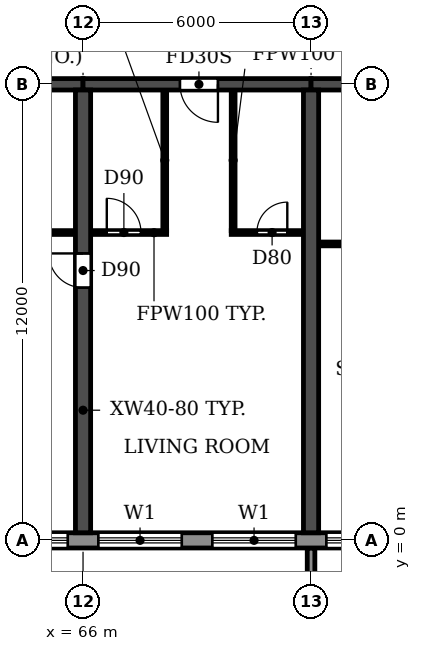
"""IFC4 building model, lengths in metres.
Left out: names, types, materials, properties, quantities, classifications, styles, units other than length and angle.
Written with IfcOpenShell. Run it as: python <this file> out.ifc"""

import sys

from ifc_helpers import new_model, si_unit, direction, frame, frame_2d, origin, place, context, subcontext, project, spatial, polyline, rectangle, outline, extrude, source, transform, mapped, element, fill, save


model = new_model("IFC4")
c1 = context("Model", 3, precision=1e-05, world=origin(), true_north=direction((0.0, 1.0)))
c2 = subcontext(c1, "Body", "Model", "MODEL_VIEW")
j1 = project(units=[si_unit("LENGTHUNIT", "METRE"), si_unit("PLANEANGLEUNIT", "RADIAN")], contexts=[c1])
p1 = place(None, origin())
s1 = spatial("IfcSite", under=j1, at=p1, CompositionType="ELEMENT")
p2 = place(p1, origin())
s2 = spatial("IfcBuilding", under=s1, at=p2, CompositionType="ELEMENT")
p3 = place(p2, frame((0.0, 0.0, 56.4)))
s3 = spatial("IfcBuildingStorey", under=s2, at=p3, CompositionType="ELEMENT", Elevation=56.4)
p4 = place(p3, frame((66.0, 0.2, 0.0), z_axis=(0.0, 0.0, 1.0), x_axis=(0.0, 1.0, 0.0)))
e1 = element("IfcWall", 1, at=p4, inside=s3, PredefinedType="SHEAR", context=c2, shape_type="SweptSolid", body=[
    extrude(rectangle(XDim=11.65, YDim=0.4, at=frame_2d((5.825, 0.0))), origin(), (0.0, 0.0, 1.0), 3.05),
])
p5 = place(p4, frame((6.45, 0.0, 0.0)))
e2 = element("IfcOpeningElement", 2, at=p5, cuts=e1, PredefinedType="OPENING", context=c2, shape_type="SweptSolid", body=[
    extrude(rectangle(XDim=0.9, YDim=2.1, at=frame_2d((0.45, 1.05))), frame((0.0, 0.21, 0.0), z_axis=(0.0, -1.0, 0.0), x_axis=(1.0, 0.0, 0.0)), (0.0, 0.0, 1.0), 0.42),
])
p6 = place(p3, frame((72.0, 0.2, 0.0), z_axis=(0.0, 0.0, 1.0), x_axis=(0.0, 1.0, 0.0)))
e3 = element("IfcWall", 3, at=p6, inside=s3, PredefinedType="SHEAR", context=c2, shape_type="SweptSolid", body=[
    extrude(rectangle(XDim=11.65, YDim=0.4, at=frame_2d((5.825, 0.0))), origin(), (0.0, 0.0, 1.0), 3.05),
])
p7 = place(p3, frame((60.0, 12.0, 0.0), z_axis=(0.0, 0.0, 1.0), x_axis=(1.0, 0.0, 0.0)))
e4 = element("IfcWall", 4, at=p7, inside=s3, PredefinedType="SHEAR", context=c2, shape_type="SweptSolid", body=[
    extrude(rectangle(XDim=6.0, YDim=0.3, at=frame_2d((3.0, 0.0))), origin(), (0.0, 0.0, 1.0), 2.45),
])
p8 = place(p3, frame((66.0, 12.0, 0.0), z_axis=(0.0, 0.0, 1.0), x_axis=(1.0, 0.0, 0.0)))
e5 = element("IfcWall", 5, at=p8, inside=s3, PredefinedType="SHEAR", context=c2, shape_type="SweptSolid", body=[
    extrude(rectangle(XDim=6.0, YDim=0.3, at=frame_2d((3.0, 0.0))), origin(), (0.0, 0.0, 1.0), 2.45),
])
p9 = place(p8, frame((2.55, 0.0, 0.0)))
e6 = element("IfcOpeningElement", 6, at=p9, cuts=e5, PredefinedType="OPENING", context=c2, shape_type="SweptSolid", body=[
    extrude(rectangle(XDim=1.0, YDim=2.1, at=frame_2d((0.5, 1.05))), frame((0.0, 0.16, 0.0), z_axis=(0.0, -1.0, 0.0), x_axis=(1.0, 0.0, 0.0)), (0.0, 0.0, 1.0), 0.32),
])
p10 = place(p3, frame((72.0, 12.0, 0.0), z_axis=(0.0, 0.0, 1.0), x_axis=(1.0, 0.0, 0.0)))
e7 = element("IfcWall", 7, at=p10, inside=s3, PredefinedType="SHEAR", context=c2, shape_type="SweptSolid", body=[
    extrude(rectangle(XDim=6.0, YDim=0.3, at=frame_2d((3.0, 0.0))), origin(), (0.0, 0.0, 1.0), 2.45),
])
p11 = place(p10, frame((2.45, 0.0, 0.0)))
e8 = element("IfcOpeningElement", 8, at=p11, cuts=e7, PredefinedType="OPENING", context=c2, shape_type="SweptSolid", body=[
    extrude(rectangle(XDim=1.0, YDim=2.1, at=frame_2d((0.5, 1.05))), frame((0.0, 0.16, 0.0), z_axis=(0.0, -1.0, 0.0), x_axis=(1.0, 0.0, 0.0)), (0.0, 0.0, 1.0), 0.32),
])
p12 = place(p3, frame((10.683, 0.0, 0.0), z_axis=(0.0, 0.0, 1.0), x_axis=(1.0, 0.0, 0.0)))
e9 = element("IfcWall", 9, at=p12, inside=s3, PredefinedType="STANDARD", context=c2, shape_type="SweptSolid", body=[
    extrude(rectangle(XDim=80.634, YDim=0.4, at=frame_2d((40.317, 0.0))), origin(), (0.0, 0.0, 1.0), 3.05),
])
p13 = place(p12, frame((1.717, 0.0, 0.9)))
e10 = element("IfcOpeningElement", 10, at=p13, cuts=e9, PredefinedType="OPENING", context=c2, shape_type="SweptSolid", body=[
    extrude(rectangle(XDim=2.2, YDim=1.5, at=frame_2d((1.1, 0.75))), frame((0.0, 0.21, 0.0), z_axis=(0.0, -1.0, 0.0), x_axis=(1.0, 0.0, 0.0)), (0.0, 0.0, 1.0), 0.42),
])
p14 = place(p12, frame((4.917, 0.0, 0.0)))
e11 = element("IfcOpeningElement", 11, at=p14, cuts=e9, PredefinedType="OPENING", context=c2, shape_type="SweptSolid", body=[
    extrude(rectangle(XDim=1.8, YDim=2.4, at=frame_2d((0.9, 1.2))), frame((0.0, 0.21, 0.0), z_axis=(0.0, -1.0, 0.0), x_axis=(1.0, 0.0, 0.0)), (0.0, 0.0, 1.0), 0.42),
])
p15 = place(p12, frame((7.717, 0.0, 0.9)))
e12 = element("IfcOpeningElement", 12, at=p15, cuts=e9, PredefinedType="OPENING", context=c2, shape_type="SweptSolid", body=[
    extrude(rectangle(XDim=2.2, YDim=1.5, at=frame_2d((1.1, 0.75))), frame((0.0, 0.21, 0.0), z_axis=(0.0, -1.0, 0.0), x_axis=(1.0, 0.0, 0.0)), (0.0, 0.0, 1.0), 0.42),
])
p16 = place(p12, frame((10.717, 0.0, 0.9)))
e13 = element("IfcOpeningElement", 13, at=p16, cuts=e9, PredefinedType="OPENING", context=c2, shape_type="SweptSolid", body=[
    extrude(rectangle(XDim=2.2, YDim=1.5, at=frame_2d((1.1, 0.75))), frame((0.0, 0.21, 0.0), z_axis=(0.0, -1.0, 0.0), x_axis=(1.0, 0.0, 0.0)), (0.0, 0.0, 1.0), 0.42),
])
p17 = place(p12, frame((13.717, 0.0, 0.9)))
e14 = element("IfcOpeningElement", 14, at=p17, cuts=e9, PredefinedType="OPENING", context=c2, shape_type="SweptSolid", body=[
    extrude(rectangle(XDim=2.2, YDim=1.5, at=frame_2d((1.1, 0.75))), frame((0.0, 0.21, 0.0), z_axis=(0.0, -1.0, 0.0), x_axis=(1.0, 0.0, 0.0)), (0.0, 0.0, 1.0), 0.42),
])
p18 = place(p12, frame((16.917, 0.0, 0.0)))
e15 = element("IfcOpeningElement", 15, at=p18, cuts=e9, PredefinedType="OPENING", context=c2, shape_type="SweptSolid", body=[
    extrude(rectangle(XDim=1.8, YDim=2.4, at=frame_2d((0.9, 1.2))), frame((0.0, 0.21, 0.0), z_axis=(0.0, -1.0, 0.0), x_axis=(1.0, 0.0, 0.0)), (0.0, 0.0, 1.0), 0.42),
])
p19 = place(p12, frame((19.717, 0.0, 0.9)))
e16 = element("IfcOpeningElement", 16, at=p19, cuts=e9, PredefinedType="OPENING", context=c2, shape_type="SweptSolid", body=[
    extrude(rectangle(XDim=2.2, YDim=1.5, at=frame_2d((1.1, 0.75))), frame((0.0, 0.21, 0.0), z_axis=(0.0, -1.0, 0.0), x_axis=(1.0, 0.0, 0.0)), (0.0, 0.0, 1.0), 0.42),
])
p20 = place(p12, frame((22.717, 0.0, 0.9)))
e17 = element("IfcOpeningElement", 17, at=p20, cuts=e9, PredefinedType="OPENING", context=c2, shape_type="SweptSolid", body=[
    extrude(rectangle(XDim=2.2, YDim=1.5, at=frame_2d((1.1, 0.75))), frame((0.0, 0.21, 0.0), z_axis=(0.0, -1.0, 0.0), x_axis=(1.0, 0.0, 0.0)), (0.0, 0.0, 1.0), 0.42),
])
p21 = place(p12, frame((25.917, 0.0, 0.0)))
e18 = element("IfcOpeningElement", 18, at=p21, cuts=e9, PredefinedType="OPENING", context=c2, shape_type="SweptSolid", body=[
    extrude(rectangle(XDim=1.8, YDim=2.4, at=frame_2d((0.9, 1.2))), frame((0.0, 0.21, 0.0), z_axis=(0.0, -1.0, 0.0), x_axis=(1.0, 0.0, 0.0)), (0.0, 0.0, 1.0), 0.42),
])
p22 = place(p12, frame((28.717, 0.0, 0.9)))
e19 = element("IfcOpeningElement", 19, at=p22, cuts=e9, PredefinedType="OPENING", context=c2, shape_type="SweptSolid", body=[
    extrude(rectangle(XDim=2.2, YDim=1.5, at=frame_2d((1.1, 0.75))), frame((0.0, 0.21, 0.0), z_axis=(0.0, -1.0, 0.0), x_axis=(1.0, 0.0, 0.0)), (0.0, 0.0, 1.0), 0.42),
])
p23 = place(p12, frame((31.717, 0.0, 0.9)))
e20 = element("IfcOpeningElement", 20, at=p23, cuts=e9, PredefinedType="OPENING", context=c2, shape_type="SweptSolid", body=[
    extrude(rectangle(XDim=2.2, YDim=1.5, at=frame_2d((1.1, 0.75))), frame((0.0, 0.21, 0.0), z_axis=(0.0, -1.0, 0.0), x_axis=(1.0, 0.0, 0.0)), (0.0, 0.0, 1.0), 0.42),
])
p24 = place(p12, frame((34.717, 0.0, 0.9)))
e21 = element("IfcOpeningElement", 21, at=p24, cuts=e9, PredefinedType="OPENING", context=c2, shape_type="SweptSolid", body=[
    extrude(rectangle(XDim=2.2, YDim=1.5, at=frame_2d((1.1, 0.75))), frame((0.0, 0.21, 0.0), z_axis=(0.0, -1.0, 0.0), x_axis=(1.0, 0.0, 0.0)), (0.0, 0.0, 1.0), 0.42),
])
p25 = place(p12, frame((37.717, 0.0, 0.9)))
e22 = element("IfcOpeningElement", 22, at=p25, cuts=e9, PredefinedType="OPENING", context=c2, shape_type="SweptSolid", body=[
    extrude(rectangle(XDim=2.2, YDim=1.5, at=frame_2d((1.1, 0.75))), frame((0.0, 0.21, 0.0), z_axis=(0.0, -1.0, 0.0), x_axis=(1.0, 0.0, 0.0)), (0.0, 0.0, 1.0), 0.42),
])
p26 = place(p12, frame((40.917, 0.0, 0.0)))
e23 = element("IfcOpeningElement", 23, at=p26, cuts=e9, PredefinedType="OPENING", context=c2, shape_type="SweptSolid", body=[
    extrude(rectangle(XDim=1.8, YDim=2.4, at=frame_2d((0.9, 1.2))), frame((0.0, 0.21, 0.0), z_axis=(0.0, -1.0, 0.0), x_axis=(1.0, 0.0, 0.0)), (0.0, 0.0, 1.0), 0.42),
])
p27 = place(p12, frame((43.717, 0.0, 0.9)))
e24 = element("IfcOpeningElement", 24, at=p27, cuts=e9, PredefinedType="OPENING", context=c2, shape_type="SweptSolid", body=[
    extrude(rectangle(XDim=2.2, YDim=1.5, at=frame_2d((1.1, 0.75))), frame((0.0, 0.21, 0.0), z_axis=(0.0, -1.0, 0.0), x_axis=(1.0, 0.0, 0.0)), (0.0, 0.0, 1.0), 0.42),
])
p28 = place(p12, frame((46.717, 0.0, 0.9)))
e25 = element("IfcOpeningElement", 25, at=p28, cuts=e9, PredefinedType="OPENING", context=c2, shape_type="SweptSolid", body=[
    extrude(rectangle(XDim=2.2, YDim=1.5, at=frame_2d((1.1, 0.75))), frame((0.0, 0.21, 0.0), z_axis=(0.0, -1.0, 0.0), x_axis=(1.0, 0.0, 0.0)), (0.0, 0.0, 1.0), 0.42),
])
p29 = place(p12, frame((49.717, 0.0, 0.9)))
e26 = element("IfcOpeningElement", 26, at=p29, cuts=e9, PredefinedType="OPENING", context=c2, shape_type="SweptSolid", body=[
    extrude(rectangle(XDim=2.2, YDim=1.5, at=frame_2d((1.1, 0.75))), frame((0.0, 0.21, 0.0), z_axis=(0.0, -1.0, 0.0), x_axis=(1.0, 0.0, 0.0)), (0.0, 0.0, 1.0), 0.42),
])
p30 = place(p12, frame((52.717, 0.0, 0.9)))
e27 = element("IfcOpeningElement", 27, at=p30, cuts=e9, PredefinedType="OPENING", context=c2, shape_type="SweptSolid", body=[
    extrude(rectangle(XDim=2.2, YDim=1.5, at=frame_2d((1.1, 0.75))), frame((0.0, 0.21, 0.0), z_axis=(0.0, -1.0, 0.0), x_axis=(1.0, 0.0, 0.0)), (0.0, 0.0, 1.0), 0.42),
])
p31 = place(p12, frame((55.717, 0.0, 0.9)))
e28 = element("IfcOpeningElement", 28, at=p31, cuts=e9, PredefinedType="OPENING", context=c2, shape_type="SweptSolid", body=[
    extrude(rectangle(XDim=2.2, YDim=1.5, at=frame_2d((1.1, 0.75))), frame((0.0, 0.21, 0.0), z_axis=(0.0, -1.0, 0.0), x_axis=(1.0, 0.0, 0.0)), (0.0, 0.0, 1.0), 0.42),
])
p32 = place(p12, frame((58.717, 0.0, 0.9)))
e29 = element("IfcOpeningElement", 29, at=p32, cuts=e9, PredefinedType="OPENING", context=c2, shape_type="SweptSolid", body=[
    extrude(rectangle(XDim=2.2, YDim=1.5, at=frame_2d((1.1, 0.75))), frame((0.0, 0.21, 0.0), z_axis=(0.0, -1.0, 0.0), x_axis=(1.0, 0.0, 0.0)), (0.0, 0.0, 1.0), 0.42),
])
p33 = place(p12, frame((61.717, 0.0, 0.9)))
e30 = element("IfcOpeningElement", 30, at=p33, cuts=e9, PredefinedType="OPENING", context=c2, shape_type="SweptSolid", body=[
    extrude(rectangle(XDim=2.2, YDim=1.5, at=frame_2d((1.1, 0.75))), frame((0.0, 0.21, 0.0), z_axis=(0.0, -1.0, 0.0), x_axis=(1.0, 0.0, 0.0)), (0.0, 0.0, 1.0), 0.42),
])
p34 = place(p12, frame((64.917, 0.0, 0.0)))
e31 = element("IfcOpeningElement", 31, at=p34, cuts=e9, PredefinedType="OPENING", context=c2, shape_type="SweptSolid", body=[
    extrude(rectangle(XDim=1.8, YDim=2.4, at=frame_2d((0.9, 1.2))), frame((0.0, 0.21, 0.0), z_axis=(0.0, -1.0, 0.0), x_axis=(1.0, 0.0, 0.0)), (0.0, 0.0, 1.0), 0.42),
])
p35 = place(p12, frame((67.717, 0.0, 0.9)))
e32 = element("IfcOpeningElement", 32, at=p35, cuts=e9, PredefinedType="OPENING", context=c2, shape_type="SweptSolid", body=[
    extrude(rectangle(XDim=2.2, YDim=1.5, at=frame_2d((1.1, 0.75))), frame((0.0, 0.21, 0.0), z_axis=(0.0, -1.0, 0.0), x_axis=(1.0, 0.0, 0.0)), (0.0, 0.0, 1.0), 0.42),
])
p36 = place(p12, frame((70.717, 0.0, 0.9)))
e33 = element("IfcOpeningElement", 33, at=p36, cuts=e9, PredefinedType="OPENING", context=c2, shape_type="SweptSolid", body=[
    extrude(rectangle(XDim=2.2, YDim=1.5, at=frame_2d((1.1, 0.75))), frame((0.0, 0.21, 0.0), z_axis=(0.0, -1.0, 0.0), x_axis=(1.0, 0.0, 0.0)), (0.0, 0.0, 1.0), 0.42),
])
p37 = place(p12, frame((73.717, 0.0, 0.9)))
e34 = element("IfcOpeningElement", 34, at=p37, cuts=e9, PredefinedType="OPENING", context=c2, shape_type="SweptSolid", body=[
    extrude(rectangle(XDim=2.2, YDim=1.5, at=frame_2d((1.1, 0.75))), frame((0.0, 0.21, 0.0), z_axis=(0.0, -1.0, 0.0), x_axis=(1.0, 0.0, 0.0)), (0.0, 0.0, 1.0), 0.42),
])
p38 = place(p12, frame((76.917, 0.0, 0.0)))
e35 = element("IfcOpeningElement", 35, at=p38, cuts=e9, PredefinedType="OPENING", context=c2, shape_type="SweptSolid", body=[
    extrude(rectangle(XDim=1.8, YDim=2.4, at=frame_2d((0.9, 1.2))), frame((0.0, 0.21, 0.0), z_axis=(0.0, -1.0, 0.0), x_axis=(1.0, 0.0, 0.0)), (0.0, 0.0, 1.0), 0.42),
])
m1 = source(origin(), c2, "Body", "SweptSolid", [
    extrude(outline(polyline([(0.0, 0.0), (0.2, 0.0), (0.2, 1.65), (0.0, 1.65), (0.0, 0.0)])), origin(), (0.0, 0.0, 1.0), 3.1),
])
p39 = place(p3, frame((71.9, -1.85, 0.0)))
e36 = element("IfcWall", 36, at=p39, inside=s3, PredefinedType="STANDARD", context=c2, shape_type="MappedRepresentation", body=[
    mapped(m1, transform((0.0, 0.0, 0.0))),
])
p40 = place(p3, frame((72.21, 7.8, 0.0), z_axis=(0.0, 0.0, 1.0), x_axis=(1.0, 0.0, 0.0)))
e37 = element("IfcWall", 37, at=p40, inside=s3, PredefinedType="PARTITIONING", context=c2, shape_type="SweptSolid", body=[
    extrude(rectangle(XDim=1.89, YDim=0.1, at=frame_2d((0.945, 0.0))), origin(), (0.0, 0.0, 1.0), 3.05),
])
p41 = place(p3, frame((63.1, 8.1, 0.0), z_axis=(0.0, 0.0, 1.0), x_axis=(1.0, 0.0, 0.0)))
e38 = element("IfcWall", 38, at=p41, inside=s3, PredefinedType="PARTITIONING", context=c2, shape_type="SweptSolid", body=[
    extrude(rectangle(XDim=2.69, YDim=0.1, at=frame_2d((1.345, 0.0))), origin(), (0.0, 0.0, 1.0), 3.05),
])
p42 = place(p41, frame((1.0, 0.0, 0.0)))
e39 = element("IfcOpeningElement", 39, at=p42, cuts=e38, PredefinedType="OPENING", context=c2, shape_type="SweptSolid", body=[
    extrude(rectangle(XDim=0.8, YDim=2.1, at=frame_2d((0.4, 1.05))), frame((0.0, 0.06, 0.0), z_axis=(0.0, -1.0, 0.0), x_axis=(1.0, 0.0, 0.0)), (0.0, 0.0, 1.0), 0.12),
])
p43 = place(p3, frame((66.21, 8.1, 0.0), z_axis=(0.0, 0.0, 1.0), x_axis=(1.0, 0.0, 0.0)))
e40 = element("IfcWall", 40, at=p43, inside=s3, PredefinedType="PARTITIONING", context=c2, shape_type="SweptSolid", body=[
    extrude(rectangle(XDim=1.99, YDim=0.1, at=frame_2d((0.995, 0.0))), origin(), (0.0, 0.0, 1.0), 3.05),
])
p44 = place(p43, frame((0.415, 0.0, 0.0)))
e41 = element("IfcOpeningElement", 41, at=p44, cuts=e40, PredefinedType="OPENING", context=c2, shape_type="SweptSolid", body=[
    extrude(rectangle(XDim=0.9, YDim=2.1, at=frame_2d((0.45, 1.05))), frame((0.0, 0.06, 0.0), z_axis=(0.0, -1.0, 0.0), x_axis=(1.0, 0.0, 0.0)), (0.0, 0.0, 1.0), 0.12),
])
p45 = place(p3, frame((69.9, 8.1, 0.0), z_axis=(0.0, 0.0, 1.0), x_axis=(1.0, 0.0, 0.0)))
e42 = element("IfcWall", 42, at=p45, inside=s3, PredefinedType="PARTITIONING", context=c2, shape_type="SweptSolid", body=[
    extrude(rectangle(XDim=1.89, YDim=0.1, at=frame_2d((0.945, 0.0))), origin(), (0.0, 0.0, 1.0), 3.05),
])
p46 = place(p45, frame((0.675, 0.0, 0.0)))
e43 = element("IfcOpeningElement", 43, at=p46, cuts=e42, PredefinedType="OPENING", context=c2, shape_type="SweptSolid", body=[
    extrude(rectangle(XDim=0.8, YDim=2.1, at=frame_2d((0.4, 1.05))), frame((0.0, 0.06, 0.0), z_axis=(0.0, -1.0, 0.0), x_axis=(1.0, 0.0, 0.0)), (0.0, 0.0, 1.0), 0.12),
])
for number, where, z_axis, x_axis in (
    (44, (68.15, 8.15, 0.0), (0.0, 0.0, 1.0), (0.0, 1.0, 0.0)),
    (45, (69.95, 8.15, 0.0), (0.0, 0.0, 1.0), (0.0, 1.0, 0.0)),
):
    element("IfcWall", number, at=place(p3, frame(where, z_axis=z_axis, x_axis=x_axis)), inside=s3, PredefinedType="PARTITIONING", context=c2, shape_type="SweptSolid", body=[
        extrude(rectangle(XDim=3.69, YDim=0.1, at=frame_2d((1.845, 0.0))), origin(), (0.0, 0.0, 1.0), 3.05),
    ])
p47 = place(p30, origin())
e46 = element("IfcWindow", 46, at=p47, inside=s3, PartitioningType="DOUBLE_PANEL_HORIZONTAL", PredefinedType="WINDOW", context=c2, shape_type="SweptSolid", body=[
    extrude(rectangle(XDim=2.2, YDim=1.5, at=frame_2d((1.1, 0.75))), frame((0.0, 0.03, 0.0), z_axis=(0.0, -1.0, 0.0), x_axis=(1.0, 0.0, 0.0)), (0.0, 0.0, 1.0), 0.06),
])
fill(e27, e46)
p48 = place(p31, origin())
e47 = element("IfcWindow", 47, at=p48, inside=s3, PartitioningType="DOUBLE_PANEL_HORIZONTAL", PredefinedType="WINDOW", context=c2, shape_type="SweptSolid", body=[
    extrude(rectangle(XDim=2.2, YDim=1.5, at=frame_2d((1.1, 0.75))), frame((0.0, 0.03, 0.0), z_axis=(0.0, -1.0, 0.0), x_axis=(1.0, 0.0, 0.0)), (0.0, 0.0, 1.0), 0.06),
])
fill(e28, e47)
p49 = place(p32, origin())
e48 = element("IfcWindow", 48, at=p49, inside=s3, PartitioningType="DOUBLE_PANEL_HORIZONTAL", PredefinedType="WINDOW", context=c2, shape_type="SweptSolid", body=[
    extrude(rectangle(XDim=2.2, YDim=1.5, at=frame_2d((1.1, 0.75))), frame((0.0, 0.03, 0.0), z_axis=(0.0, -1.0, 0.0), x_axis=(1.0, 0.0, 0.0)), (0.0, 0.0, 1.0), 0.06),
])
fill(e29, e48)
p50 = place(p33, origin())
e49 = element("IfcWindow", 49, at=p50, inside=s3, PartitioningType="DOUBLE_PANEL_HORIZONTAL", PredefinedType="WINDOW", context=c2, shape_type="SweptSolid", body=[
    extrude(rectangle(XDim=2.2, YDim=1.5, at=frame_2d((1.1, 0.75))), frame((0.0, 0.03, 0.0), z_axis=(0.0, -1.0, 0.0), x_axis=(1.0, 0.0, 0.0)), (0.0, 0.0, 1.0), 0.06),
])
fill(e30, e49)
p51 = place(p5, origin())
e50 = element("IfcDoor", 50, at=p51, inside=s3, OperationType="SINGLE_SWING_RIGHT", PredefinedType="DOOR", context=c2, shape_type="SweptSolid", body=[
    extrude(rectangle(XDim=0.9, YDim=2.1, at=frame_2d((0.45, 1.05))), frame((0.0, 0.025, 0.0), z_axis=(0.0, -1.0, 0.0), x_axis=(1.0, 0.0, 0.0)), (0.0, 0.0, 1.0), 0.05),
])
fill(e2, e50)
p52 = place(p44, origin())
e51 = element("IfcDoor", 51, at=p52, inside=s3, OperationType="SINGLE_SWING_LEFT", PredefinedType="DOOR", context=c2, shape_type="SweptSolid", body=[
    extrude(rectangle(XDim=0.9, YDim=2.1, at=frame_2d((0.45, 1.05))), frame((0.0, 0.025, 0.0), z_axis=(0.0, -1.0, 0.0), x_axis=(1.0, 0.0, 0.0)), (0.0, 0.0, 1.0), 0.05),
])
fill(e41, e51)
p53 = place(p9, frame((1.0, 0.0, 0.0), z_axis=(0.0, 0.0, 1.0), x_axis=(-1.0, 0.0, 0.0)))
e52 = element("IfcDoor", 52, at=p53, inside=s3, OperationType="SINGLE_SWING_LEFT", PredefinedType="DOOR", context=c2, shape_type="SweptSolid", body=[
    extrude(rectangle(XDim=1.0, YDim=2.1, at=frame_2d((0.5, 1.05))), frame((0.0, 0.025, 0.0), z_axis=(0.0, -1.0, 0.0), x_axis=(1.0, 0.0, 0.0)), (0.0, 0.0, 1.0), 0.05),
])
fill(e6, e52)
p54 = place(p46, origin())
e53 = element("IfcDoor", 53, at=p54, inside=s3, OperationType="SINGLE_SWING_RIGHT", PredefinedType="DOOR", context=c2, shape_type="SweptSolid", body=[
    extrude(rectangle(XDim=0.8, YDim=2.1, at=frame_2d((0.4, 1.05))), frame((0.0, 0.025, 0.0), z_axis=(0.0, -1.0, 0.0), x_axis=(1.0, 0.0, 0.0)), (0.0, 0.0, 1.0), 0.05),
])
fill(e43, e53)
save(model, sys.argv[1])
